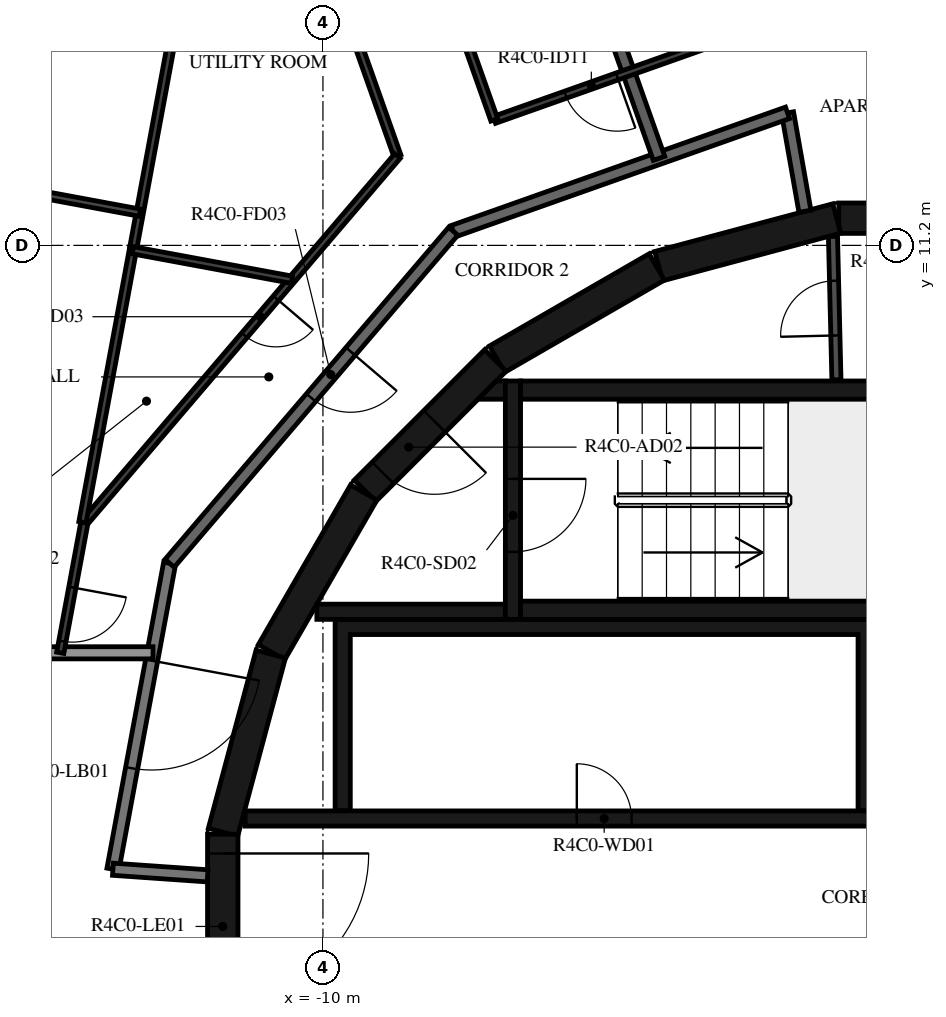
"""IFC4 building model, lengths in metres.
Left out: names, types, materials, properties, quantities, classifications, styles, units other than length and angle.
Written with IfcOpenShell. Run it as: python <this file> out.ifc"""

import sys

from ifc_helpers import new_model, si_unit, direction, frame, frame_2d, origin, place, context, subcontext, project, spatial, polyline, rectangle, outline, extrude, element, fill, save


model = new_model("IFC4")
c1 = context("Model", 3, precision=1e-05, world=origin(), true_north=direction((0.0, 1.0)))
c2 = subcontext(c1, "Body", "Model", "MODEL_VIEW")
j1 = project(units=[si_unit("LENGTHUNIT", "METRE"), si_unit("PLANEANGLEUNIT", "RADIAN")], contexts=[c1])
p1 = place(None, origin())
s1 = spatial("IfcSite", under=j1, at=p1, CompositionType="ELEMENT")
p2 = place(p1, origin())
s2 = spatial("IfcBuilding", under=s1, at=p2, CompositionType="ELEMENT")
p3 = place(p2, frame((0.0, 0.0, 172.7)))
s3 = spatial("IfcBuildingStorey", under=s2, at=p3, CompositionType="ELEMENT", Elevation=172.7)
for number, where, z_axis, x_axis in (
    (1, (1.516, 11.647, 0.0), (0.0, 0.0, 1.0), (-1.0, 0.0, 0.0)),
    (2, (-1.55, 11.643, 0.0), (0.0, 0.0, 1.0), (-0.966, -0.259, 0.0)),
    (3, (-4.51, 10.845, 0.0), (0.0, 0.0, 1.0), (-0.866, -0.5, 0.0)),
):
    element("IfcWall", number, at=place(p3, frame(where, z_axis=z_axis, x_axis=x_axis)), inside=s3, PredefinedType="SHEAR", context=c2, shape_type="SweptSolid", body=[
        extrude(rectangle(XDim=3.033, YDim=0.5, at=frame_2d((1.516, 0.0))), origin(), (0.0, 0.0, 1.0), 3.12),
    ])
p4 = place(p3, frame((-7.164, 9.308, 0.0), z_axis=(0.0, 0.0, 1.0), x_axis=(-0.707106781187, -0.707106781187, 0.0)))
e4 = element("IfcWall", 4, at=p4, inside=s3, PredefinedType="SHEAR", context=c2, shape_type="SweptSolid", body=[
    extrude(rectangle(XDim=3.032, YDim=0.5, at=frame_2d((1.516, 0.0))), origin(), (0.0, 0.0, 1.0), 3.12),
])
p5 = place(p4, frame((1.416, 0.0, 0.0)))
e5 = element("IfcOpeningElement", 5, at=p5, cuts=e4, PredefinedType="OPENING", context=c2, shape_type="SweptSolid", body=[
    extrude(rectangle(XDim=1.2, YDim=2.1, at=frame_2d((0.6, 1.05))), frame((0.0, 0.26, 0.0), z_axis=(0.0, -1.0, 0.0), x_axis=(1.0, 0.0, 0.0)), (0.0, 0.0, 1.0), 0.52),
])
for number, where, z_axis, x_axis in (
    (6, (-9.329, 7.137, 0.0), (0.0, 0.0, 1.0), (-0.5, -0.866, 0.0)),
    (7, (-10.858, 4.479, 0.0), (0.0, 0.0, 1.0), (-0.259, -0.966, 0.0)),
):
    element("IfcWall", number, at=place(p3, frame(where, z_axis=z_axis, x_axis=x_axis)), inside=s3, PredefinedType="SHEAR", context=c2, shape_type="SweptSolid", body=[
        extrude(rectangle(XDim=3.033, YDim=0.5, at=frame_2d((1.516, 0.0))), origin(), (0.0, 0.0, 1.0), 3.12),
    ])
p6 = place(p3, frame((-11.647, 1.516, 0.0), z_axis=(0.0, 0.0, 1.0), x_axis=(0.0, -1.0, 0.0)))
e8 = element("IfcWall", 8, at=p6, inside=s3, PredefinedType="SHEAR", context=c2, shape_type="SweptSolid", body=[
    extrude(rectangle(XDim=3.033, YDim=0.5, at=frame_2d((1.516, 0.0))), origin(), (0.0, 0.0, 1.0), 3.12),
])
p7 = place(p6, frame((0.316, 0.0, 0.0)))
e9 = element("IfcOpeningElement", 9, at=p7, cuts=e8, PredefinedType="OPENING", context=c2, shape_type="SweptSolid", body=[
    extrude(rectangle(XDim=2.4, YDim=2.1, at=frame_2d((1.2, 1.05))), frame((0.0, 0.26, 0.0), z_axis=(0.0, -1.0, 0.0), x_axis=(1.0, 0.0, 0.0)), (0.0, 0.0, 1.0), 0.52),
])
for number, where, z_axis, x_axis in (
    (10, (-6.75, 5.2, 0.0), (0.0, 0.0, 1.0), (1.0, 0.0, 0.0)),
    (11, (-6.75, 8.82, 0.0), (0.0, 0.0, 1.0), (1.0, 0.0, 0.0)),
):
    element("IfcWall", number, at=place(p3, frame(where, z_axis=z_axis, x_axis=x_axis)), inside=s3, PredefinedType="SHEAR", context=c2, shape_type="SweptSolid", body=[
        extrude(rectangle(XDim=6.75, YDim=0.3, at=frame_2d((3.375, 0.0))), origin(), (0.0, 0.0, 1.0), 3.12),
    ])
p8 = place(p3, frame((-6.875, 8.97, 0.0), z_axis=(0.0, 0.0, 1.0), x_axis=(0.0, -1.0, 0.0)))
e12 = element("IfcWall", 12, at=p8, inside=s3, PredefinedType="SHEAR", context=c2, shape_type="SweptSolid", body=[
    extrude(rectangle(XDim=3.92, YDim=0.25, at=frame_2d((1.96, 0.0))), origin(), (0.0, 0.0, 1.0), 3.12),
])
p9 = place(p8, frame((1.61, 0.0, 0.0)))
e13 = element("IfcOpeningElement", 13, at=p9, cuts=e12, PredefinedType="OPENING", context=c2, shape_type="SweptSolid", body=[
    extrude(rectangle(XDim=1.2, YDim=2.1, at=frame_2d((0.6, 1.05))), frame((0.0, 0.135, 0.0), z_axis=(0.0, -1.0, 0.0), x_axis=(1.0, 0.0, 0.0)), (0.0, 0.0, 1.0), 0.27),
])
p10 = place(p3, frame((-7.0, 5.175, 0.0), z_axis=(0.0, 0.0, 1.0), x_axis=(-1.0, 0.0, 0.0)))
e14 = element("IfcWall", 14, at=p10, inside=s3, PredefinedType="SHEAR", context=c2, shape_type="SweptSolid", body=[
    extrude(rectangle(XDim=3.1, YDim=0.25, at=frame_2d((1.55, 0.0))), origin(), (0.0, 0.0, 1.0), 3.12),
])
p11 = place(p3, origin())
e15 = element("IfcWall", 15, at=p11, inside=s3, PredefinedType="SHEAR", context=c2, shape_type="SweptSolid", body=[
    extrude(outline(polyline([(-7.148, 8.97), (-7.0, 8.97), (-7.0, 8.67), (-7.448, 8.67), (-7.148, 8.97)])), origin(), (0.0, 0.0, 1.0), 3.12),
])
p12 = place(p3, origin())
e16 = element("IfcWall", 16, at=p12, inside=s3, PredefinedType="SHEAR", context=c2, shape_type="SweptSolid", body=[
    extrude(outline(polyline([(-9.55, 4.8), (-1.2, 4.8), (-1.2, 1.9), (-0.95, 1.9), (-0.95, 4.8), (0.95, 4.8), (0.95, 1.9), (1.2, 1.9), (1.2, 4.8), (3.1, 4.8), (3.1, 1.9), (3.35, 1.9), (3.35, 4.8), (5.25, 4.8), (5.25, 1.9), (5.5, 1.9), (5.5, 4.8), (7.4, 4.8), (7.4, 1.9), (7.65, 1.9), (7.65, 4.8), (9.55, 4.8), (9.55, 1.9), (9.8, 1.9), (9.8, 4.8), (9.8, 5.05), (-9.8, 5.05), (-9.8, 4.8), (-9.8, 1.9), (-9.55, 1.9), (-9.55, 4.8)])), origin(), (0.0, 0.0, 1.0), 3.12),
])
p13 = place(p3, frame((-11.28, 1.775, 0.0), z_axis=(0.0, 0.0, 1.0), x_axis=(1.0, 0.0, 0.0)))
e17 = element("IfcWall", 17, at=p13, inside=s3, PredefinedType="SHEAR", context=c2, shape_type="SweptSolid", body=[
    extrude(rectangle(XDim=14.38, YDim=0.25, at=frame_2d((7.19, 0.0))), origin(), (0.0, 0.0, 1.0), 3.12),
])
p14 = place(p13, frame((10.73, 0.0, 0.0)))
e18 = element("IfcOpeningElement", 18, at=p14, cuts=e17, PredefinedType="OPENING", context=c2, shape_type="SweptSolid", body=[
    extrude(rectangle(XDim=1.1, YDim=2.1, at=frame_2d((0.55, 1.05))), frame((0.0, 0.135, 0.0), z_axis=(0.0, -1.0, 0.0), x_axis=(1.0, 0.0, 0.0)), (0.0, 0.0, 1.0), 0.27),
])
p15 = place(p13, frame((12.88, 0.0, 0.0)))
e19 = element("IfcOpeningElement", 19, at=p15, cuts=e17, PredefinedType="OPENING", context=c2, shape_type="SweptSolid", body=[
    extrude(rectangle(XDim=1.1, YDim=2.1, at=frame_2d((0.55, 1.05))), frame((0.0, 0.135, 0.0), z_axis=(0.0, -1.0, 0.0), x_axis=(1.0, 0.0, 0.0)), (0.0, 0.0, 1.0), 0.27),
])
p16 = place(p13, frame((5.455, 0.0, 0.0)))
e20 = element("IfcOpeningElement", 20, at=p16, cuts=e17, PredefinedType="OPENING", context=c2, shape_type="SweptSolid", body=[
    extrude(rectangle(XDim=0.9, YDim=2.1, at=frame_2d((0.45, 1.05))), frame((0.0, 0.135, 0.0), z_axis=(0.0, -1.0, 0.0), x_axis=(1.0, 0.0, 0.0)), (0.0, 0.0, 1.0), 0.27),
])
p17 = place(p3, frame((-1.555, 8.99, 0.0), z_axis=(0.0, 0.0, 1.0), x_axis=(-0.024125549686, 0.999708936567, 0.0)))
e21 = element("IfcWall", 21, at=p17, inside=s3, PredefinedType="PARTITIONING", context=c2, shape_type="SweptSolid", body=[
    extrude(rectangle(XDim=2.358, YDim=0.15, at=frame_2d((1.179, 0.0))), origin(), (0.0, 0.0, 1.0), 3.12),
])
p18 = place(p17, frame((0.729, 0.0, 0.0)))
e22 = element("IfcOpeningElement", 22, at=p18, cuts=e21, PredefinedType="OPENING", context=c2, shape_type="SweptSolid", body=[
    extrude(rectangle(XDim=0.9, YDim=2.1, at=frame_2d((0.45, 1.05))), frame((0.0, 0.085, 0.0), z_axis=(0.0, -1.0, 0.0), x_axis=(1.0, 0.0, 0.0)), (0.0, 0.0, 1.0), 0.17),
])
p19 = place(p3, frame((-12.521, 5.972, 0.0), z_axis=(0.0, 0.0, 1.0), x_axis=(-0.182251559718, -0.983251935661, 0.0)))
e23 = element("IfcWall", 23, at=p19, inside=s3, PredefinedType="STANDARD", context=c2, shape_type="SweptSolid", body=[
    extrude(rectangle(XDim=5.117, YDim=0.2, at=frame_2d((2.559, 0.0))), origin(), (0.0, 0.0, 1.0), 3.12),
])
p20 = place(p19, frame((1.627, 0.0, 0.0)))
e24 = element("IfcOpeningElement", 24, at=p20, cuts=e23, PredefinedType="OPENING", context=c2, shape_type="SweptSolid", body=[
    extrude(rectangle(XDim=1.8, YDim=2.1, at=frame_2d((0.9, 1.05))), frame((0.0, 0.11, 0.0), z_axis=(0.0, -1.0, 0.0), x_axis=(1.0, 0.0, 0.0)), (0.0, 0.0, 1.0), 0.22),
])
p21 = place(p3, frame((-13.454, 0.941, 0.0), z_axis=(0.0, 0.0, 1.0), x_axis=(0.99755155062, -0.069934997354, 0.0)))
e25 = element("IfcWall", 25, at=p21, inside=s3, PredefinedType="STANDARD", context=c2, shape_type="SweptSolid", body=[
    extrude(rectangle(XDim=1.561, YDim=0.2, at=frame_2d((0.78, 0.0))), origin(), (0.0, 0.0, 1.0), 3.12),
])
p22 = place(p3, frame((-2.074, 11.761, 0.0), z_axis=(0.0, 0.0, 1.0), x_axis=(-0.1736412798, 0.984808969267, 0.0)))
e26 = element("IfcWall", 26, at=p22, inside=s3, PredefinedType="STANDARD", context=c2, shape_type="SweptSolid", body=[
    extrude(rectangle(XDim=1.644, YDim=0.2, at=frame_2d((0.822, 0.0))), origin(), (0.0, 0.0, 1.0), 3.12),
])
p23 = place(p3, frame((-2.359, 13.38, 0.0), z_axis=(0.0, 0.0, 1.0), x_axis=(-0.942647529236, -0.333789807551, 0.0)))
e27 = element("IfcWall", 27, at=p23, inside=s3, PredefinedType="STANDARD", context=c2, shape_type="SweptSolid", body=[
    extrude(rectangle(XDim=5.833, YDim=0.2, at=frame_2d((2.917, 0.0))), origin(), (0.0, 0.0, 1.0), 3.12),
])
p24 = place(p3, frame((-7.858, 11.433, 0.0), z_axis=(0.0, 0.0, 1.0), x_axis=(-0.649440801937, -0.760412154545, 0.0)))
e28 = element("IfcWall", 28, at=p24, inside=s3, PredefinedType="STANDARD", context=c2, shape_type="SweptSolid", body=[
    extrude(rectangle(XDim=7.181, YDim=0.2, at=frame_2d((3.59, 0.0))), origin(), (0.0, 0.0, 1.0), 3.12),
])
p25 = place(p24, frame((2.6, 0.0, 0.0)))
e29 = element("IfcOpeningElement", 29, at=p25, cuts=e28, PredefinedType="OPENING", context=c2, shape_type="SweptSolid", body=[
    extrude(rectangle(XDim=1.0, YDim=2.1, at=frame_2d((0.5, 1.05))), frame((0.0, 0.11, 0.0), z_axis=(0.0, -1.0, 0.0), x_axis=(1.0, 0.0, 0.0)), (0.0, 0.0, 1.0), 0.22),
])
p26 = place(p3, frame((-12.794, 4.5, 0.0), z_axis=(0.0, 0.0, 1.0), x_axis=(-1.0, 0.0, 0.0)))
e30 = element("IfcWall", 30, at=p26, inside=s3, PredefinedType="STANDARD", context=c2, shape_type="SweptSolid", body=[
    extrude(rectangle(XDim=5.106, YDim=0.2, at=frame_2d((2.553, 0.0))), origin(), (0.0, 0.0, 1.0), 2.73),
])
p27 = place(p3, frame((-5.839, 16.488, 0.0), z_axis=(0.0, 0.0, 1.0), x_axis=(0.333840515054, -0.942629572265, 0.0)))
e31 = element("IfcWall", 31, at=p27, inside=s3, PredefinedType="STANDARD", context=c2, shape_type="SweptSolid", body=[
    extrude(rectangle(XDim=4.092, YDim=0.2, at=frame_2d((2.046, 0.0))), origin(), (0.0, 0.0, 1.0), 3.12),
])
p28 = place(p3, frame((8.702, 12.206, 0.0), z_axis=(0.0, 0.0, 1.0), x_axis=(-0.760401313718, 0.649453494945, 0.0)))
e32 = element("IfcWall", 32, at=p28, inside=s3, PredefinedType="PARTITIONING", context=c2, shape_type="SweptSolid", body=[
    extrude(rectangle(XDim=16.724, YDim=0.12, at=frame_2d((8.362, 0.0))), origin(), (0.0, 0.0, 1.0), 3.12),
])
p29 = place(p28, frame((0.2, 0.0, 0.0)))
e33 = element("IfcOpeningElement", 33, at=p29, cuts=e32, PredefinedType="OPENING", context=c2, shape_type="SweptSolid", body=[
    extrude(rectangle(XDim=0.9, YDim=2.1, at=frame_2d((0.45, 1.05))), frame((0.0, 0.07, 0.0), z_axis=(0.0, -1.0, 0.0), x_axis=(1.0, 0.0, 0.0)), (0.0, 0.0, 1.0), 0.14),
])
p30 = place(p28, frame((8.02, 0.0, 0.0)))
e34 = element("IfcOpeningElement", 34, at=p30, cuts=e32, PredefinedType="OPENING", context=c2, shape_type="SweptSolid", body=[
    extrude(rectangle(XDim=0.9, YDim=2.1, at=frame_2d((0.45, 1.05))), frame((0.0, 0.07, 0.0), z_axis=(0.0, -1.0, 0.0), x_axis=(1.0, 0.0, 0.0)), (0.0, 0.0, 1.0), 0.14),
])
p31 = place(p28, frame((14.412, 0.0, 0.0)))
e35 = element("IfcOpeningElement", 35, at=p31, cuts=e32, PredefinedType="OPENING", context=c2, shape_type="SweptSolid", body=[
    extrude(rectangle(XDim=0.9, YDim=2.1, at=frame_2d((0.45, 1.05))), frame((0.0, 0.07, 0.0), z_axis=(0.0, -1.0, 0.0), x_axis=(1.0, 0.0, 0.0)), (0.0, 0.0, 1.0), 0.14),
])
p32 = place(p3, frame((6.641, 13.923, 0.0), z_axis=(0.0, 0.0, 1.0), x_axis=(-0.983250157272, 0.182261153912, 0.0)))
e36 = element("IfcWall", 36, at=p32, inside=s3, PredefinedType="PARTITIONING", context=c2, shape_type="SweptSolid", body=[
    extrude(rectangle(XDim=7.985, YDim=0.12, at=frame_2d((3.992, 0.0))), origin(), (0.0, 0.0, 1.0), 3.12),
])
p33 = place(p32, frame((1.4, 0.0, 0.0)))
e37 = element("IfcOpeningElement", 37, at=p33, cuts=e36, PredefinedType="OPENING", context=c2, shape_type="SweptSolid", body=[
    extrude(rectangle(XDim=0.8, YDim=2.1, at=frame_2d((0.4, 1.05))), frame((0.0, 0.07, 0.0), z_axis=(0.0, -1.0, 0.0), x_axis=(1.0, 0.0, 0.0)), (0.0, 0.0, 1.0), 0.14),
])
p34 = place(p32, frame((5.069, 0.0, 0.0)))
e38 = element("IfcOpeningElement", 38, at=p34, cuts=e36, PredefinedType="OPENING", context=c2, shape_type="SweptSolid", body=[
    extrude(rectangle(XDim=0.9, YDim=2.1, at=frame_2d((0.45, 1.05))), frame((0.0, 0.07, 0.0), z_axis=(0.0, -1.0, 0.0), x_axis=(1.0, 0.0, 0.0)), (0.0, 0.0, 1.0), 0.14),
])
p35 = place(p3, frame((-2.852, 14.797, 0.0), z_axis=(0.0, 0.0, 1.0), x_axis=(-0.942629664375, -0.333840254973, 0.0)))
e39 = element("IfcWall", 39, at=p35, inside=s3, PredefinedType="PARTITIONING", context=c2, shape_type="SweptSolid", body=[
    extrude(rectangle(XDim=4.593, YDim=0.12, at=frame_2d((2.297, 0.0))), origin(), (0.0, 0.0, 1.0), 3.12),
])
p36 = place(p35, frame((2.451, 0.0, 0.0)))
e40 = element("IfcOpeningElement", 40, at=p36, cuts=e39, PredefinedType="OPENING", context=c2, shape_type="SweptSolid", body=[
    extrude(rectangle(XDim=0.9, YDim=2.1, at=frame_2d((0.45, 1.05))), frame((0.0, 0.07, 0.0), z_axis=(0.0, -1.0, 0.0), x_axis=(1.0, 0.0, 0.0)), (0.0, 0.0, 1.0), 0.14),
])
p37 = place(p3, frame((-7.181, 13.263, 0.0), z_axis=(0.0, 0.0, 1.0), x_axis=(-0.333822798183, 0.942635846663, 0.0)))
e41 = element("IfcWall", 41, at=p37, inside=s3, PredefinedType="PARTITIONING", context=c2, shape_type="SweptSolid", body=[
    extrude(rectangle(XDim=3.527, YDim=0.12, at=frame_2d((1.764, 0.0))), origin(), (0.0, 0.0, 1.0), 3.12),
])
p38 = place(p3, frame((-9.961, 16.021, 0.0), z_axis=(0.0, 0.0, 1.0), x_axis=(0.333803930912, -0.94264252806, 0.0)))
e42 = element("IfcWall", 42, at=p38, inside=s3, PredefinedType="PARTITIONING", context=c2, shape_type="SweptSolid", body=[
    extrude(rectangle(XDim=3.556, YDim=0.12, at=frame_2d((1.778, 0.0))), origin(), (0.0, 0.0, 1.0), 3.12),
])
p39 = place(p3, frame((-8.774, 12.669, 0.0), z_axis=(0.0, 0.0, 1.0), x_axis=(-0.649446157105, -0.760407580855, 0.0)))
e43 = element("IfcWall", 43, at=p39, inside=s3, PredefinedType="PARTITIONING", context=c2, shape_type="SweptSolid", body=[
    extrude(rectangle(XDim=7.927, YDim=0.12, at=frame_2d((3.964, 0.0))), origin(), (0.0, 0.0, 1.0), 3.12),
])
p40 = place(p39, frame((3.074, 0.0, 0.0)))
e44 = element("IfcOpeningElement", 44, at=p40, cuts=e43, PredefinedType="OPENING", context=c2, shape_type="SweptSolid", body=[
    extrude(rectangle(XDim=0.8, YDim=2.1, at=frame_2d((0.4, 1.05))), frame((0.0, 0.07, 0.0), z_axis=(0.0, -1.0, 0.0), x_axis=(1.0, 0.0, 0.0)), (0.0, 0.0, 1.0), 0.14),
])
p41 = place(p3, frame((-13.923, 6.641, 0.0), z_axis=(0.0, 0.0, 1.0), x_axis=(-0.182209715759, -0.983259690765, 0.0)))
e45 = element("IfcWall", 45, at=p41, inside=s3, PredefinedType="PARTITIONING", context=c2, shape_type="SweptSolid", body=[
    extrude(rectangle(XDim=2.177, YDim=0.12, at=frame_2d((1.089, 0.0))), origin(), (0.0, 0.0, 1.0), 3.12),
])
p42 = place(p41, frame((1.083, 0.0, 0.0)))
e46 = element("IfcOpeningElement", 46, at=p42, cuts=e45, PredefinedType="OPENING", context=c2, shape_type="SweptSolid", body=[
    extrude(rectangle(XDim=0.9, YDim=2.1, at=frame_2d((0.45, 1.05))), frame((0.0, 0.07, 0.0), z_axis=(0.0, -1.0, 0.0), x_axis=(1.0, 0.0, 0.0)), (0.0, 0.0, 1.0), 0.14),
])
p43 = place(p3, frame((-13.955, 6.647, 0.0), z_axis=(0.0, 0.0, 1.0), x_axis=(0.182264522222, 0.983249532896, 0.0)))
e47 = element("IfcWall", 47, at=p43, inside=s3, PredefinedType="PARTITIONING", context=c2, shape_type="SweptSolid", body=[
    extrude(rectangle(XDim=4.589, YDim=0.12, at=frame_2d((2.294, 0.0))), origin(), (0.0, 0.0, 1.0), 3.12),
])
p44 = place(p3, frame((-11.396, 20.453, 0.0), z_axis=(0.0, 0.0, 1.0), x_axis=(-0.182223370439, -0.983257160292, 0.0)))
e48 = element("IfcWall", 48, at=p44, inside=s3, PredefinedType="PARTITIONING", context=c2, shape_type="SweptSolid", body=[
    extrude(rectangle(XDim=9.452, YDim=0.12, at=frame_2d((4.726, 0.0))), origin(), (0.0, 0.0, 1.0), 3.12),
])
p45 = place(p44, frame((3.319, 0.0, 0.0)))
e49 = element("IfcOpeningElement", 49, at=p45, cuts=e48, PredefinedType="OPENING", context=c2, shape_type="SweptSolid", body=[
    extrude(rectangle(XDim=0.9, YDim=2.1, at=frame_2d((0.45, 1.05))), frame((0.0, 0.07, 0.0), z_axis=(0.0, -1.0, 0.0), x_axis=(1.0, 0.0, 0.0)), (0.0, 0.0, 1.0), 0.14),
])
p46 = place(p44, frame((0.2, 0.0, 0.0)))
e50 = element("IfcOpeningElement", 50, at=p46, cuts=e48, PredefinedType="OPENING", context=c2, shape_type="SweptSolid", body=[
    extrude(rectangle(XDim=0.9, YDim=2.1, at=frame_2d((0.45, 1.05))), frame((0.0, 0.07, 0.0), z_axis=(0.0, -1.0, 0.0), x_axis=(1.0, 0.0, 0.0)), (0.0, 0.0, 1.0), 0.14),
])
p47 = place(p3, frame((-13.126, 11.12, 0.0), z_axis=(0.0, 0.0, 1.0), x_axis=(0.983257646361, -0.182220747645, 0.0)))
e51 = element("IfcWall", 51, at=p47, inside=s3, PredefinedType="PARTITIONING", context=c2, shape_type="SweptSolid", body=[
    extrude(rectangle(XDim=2.659, YDim=0.12, at=frame_2d((1.33, 0.0))), origin(), (0.0, 0.0, 1.0), 3.12),
])
p48 = place(p3, frame((-16.552, 12.394, 0.0), z_axis=(0.0, 0.0, 1.0), x_axis=(0.983257712156, -0.182220392618, 0.0)))
e52 = element("IfcWall", 52, at=p48, inside=s3, PredefinedType="PARTITIONING", context=c2, shape_type="SweptSolid", body=[
    extrude(rectangle(XDim=3.6, YDim=0.12, at=frame_2d((1.8, 0.0))), origin(), (0.0, 0.0, 1.0), 2.73),
])
p49 = place(p9, origin())
e53 = element("IfcDoor", 53, at=p49, inside=s3, OperationType="SINGLE_SWING_LEFT", PredefinedType="DOOR", context=c2, shape_type="SweptSolid", body=[
    extrude(rectangle(XDim=1.2, YDim=2.1, at=frame_2d((0.6, 1.05))), frame((0.0, 0.025, 0.0), z_axis=(0.0, -1.0, 0.0), x_axis=(1.0, 0.0, 0.0)), (0.0, 0.0, 1.0), 0.05),
])
fill(e13, e53)
p50 = place(p5, origin())
e54 = element("IfcDoor", 54, at=p50, inside=s3, OperationType="SINGLE_SWING_RIGHT", PredefinedType="DOOR", context=c2, shape_type="SweptSolid", body=[
    extrude(rectangle(XDim=1.2, YDim=2.1, at=frame_2d((0.6, 1.05))), frame((0.0, 0.025, 0.0), z_axis=(0.0, -1.0, 0.0), x_axis=(1.0, 0.0, 0.0)), (0.0, 0.0, 1.0), 0.05),
])
fill(e5, e54)
p51 = place(p7, origin())
e55 = element("IfcDoor", 55, at=p51, inside=s3, OperationType="DOUBLE_DOOR_SINGLE_SWING", PredefinedType="DOOR", context=c2, shape_type="SweptSolid", body=[
    extrude(rectangle(XDim=2.4, YDim=2.1, at=frame_2d((1.2, 1.05))), frame((0.0, 0.025, 0.0), z_axis=(0.0, -1.0, 0.0), x_axis=(1.0, 0.0, 0.0)), (0.0, 0.0, 1.0), 0.05),
])
fill(e9, e55)
p52 = place(p16, origin())
e56 = element("IfcDoor", 56, at=p52, inside=s3, OperationType="SINGLE_SWING_LEFT", PredefinedType="DOOR", context=c2, shape_type="SweptSolid", body=[
    extrude(rectangle(XDim=0.9, YDim=2.1, at=frame_2d((0.45, 1.05))), frame((0.0, 0.025, 0.0), z_axis=(0.0, -1.0, 0.0), x_axis=(1.0, 0.0, 0.0)), (0.0, 0.0, 1.0), 0.05),
])
fill(e20, e56)
p53 = place(p18, origin())
e57 = element("IfcDoor", 57, at=p53, inside=s3, OperationType="SINGLE_SWING_RIGHT", PredefinedType="DOOR", context=c2, shape_type="SweptSolid", body=[
    extrude(rectangle(XDim=0.9, YDim=2.1, at=frame_2d((0.45, 1.05))), frame((0.0, 0.025, 0.0), z_axis=(0.0, -1.0, 0.0), x_axis=(1.0, 0.0, 0.0)), (0.0, 0.0, 1.0), 0.05),
])
fill(e22, e57)
p54 = place(p25, origin())
e58 = element("IfcDoor", 58, at=p54, inside=s3, OperationType="SINGLE_SWING_LEFT", PredefinedType="DOOR", context=c2, shape_type="SweptSolid", body=[
    extrude(rectangle(XDim=1.0, YDim=2.1, at=frame_2d((0.5, 1.05))), frame((0.0, 0.025, 0.0), z_axis=(0.0, -1.0, 0.0), x_axis=(1.0, 0.0, 0.0)), (0.0, 0.0, 1.0), 0.05),
])
fill(e29, e58)
p55 = place(p36, origin())
e59 = element("IfcDoor", 59, at=p55, inside=s3, OperationType="SINGLE_SWING_LEFT", PredefinedType="DOOR", context=c2, shape_type="SweptSolid", body=[
    extrude(rectangle(XDim=0.9, YDim=2.1, at=frame_2d((0.45, 1.05))), frame((0.0, 0.025, 0.0), z_axis=(0.0, -1.0, 0.0), x_axis=(1.0, 0.0, 0.0)), (0.0, 0.0, 1.0), 0.05),
])
fill(e40, e59)
p56 = place(p40, origin())
e60 = element("IfcDoor", 60, at=p56, inside=s3, OperationType="SINGLE_SWING_LEFT", PredefinedType="DOOR", context=c2, shape_type="SweptSolid", body=[
    extrude(rectangle(XDim=0.8, YDim=2.1, at=frame_2d((0.4, 1.05))), frame((0.0, 0.025, 0.0), z_axis=(0.0, -1.0, 0.0), x_axis=(1.0, 0.0, 0.0)), (0.0, 0.0, 1.0), 0.05),
])
fill(e44, e60)
p57 = place(p42, origin())
e61 = element("IfcDoor", 61, at=p57, inside=s3, OperationType="SINGLE_SWING_LEFT", PredefinedType="DOOR", context=c2, shape_type="SweptSolid", body=[
    extrude(rectangle(XDim=0.9, YDim=2.1, at=frame_2d((0.45, 1.05))), frame((0.0, 0.025, 0.0), z_axis=(0.0, -1.0, 0.0), x_axis=(1.0, 0.0, 0.0)), (0.0, 0.0, 1.0), 0.05),
])
fill(e46, e61)
p58 = place(p20, origin())
e62 = element("IfcDoor", 62, at=p58, inside=s3, OperationType="DOUBLE_DOOR_SINGLE_SWING", PredefinedType="DOOR", context=c2, shape_type="SweptSolid", body=[
    extrude(rectangle(XDim=1.8, YDim=2.1, at=frame_2d((0.9, 1.05))), frame((0.0, 0.025, 0.0), z_axis=(0.0, -1.0, 0.0), x_axis=(1.0, 0.0, 0.0)), (0.0, 0.0, 1.0), 0.05),
])
fill(e24, e62)
save(model, sys.argv[1])
